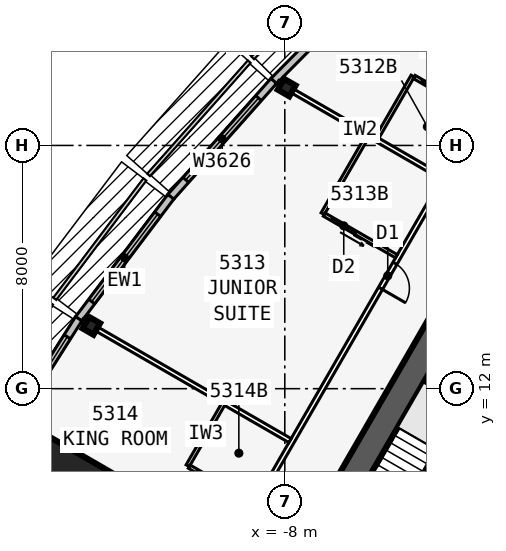
"""IFC4 building model, lengths in metres.
Left out: names, types, materials, properties, quantities, classifications, styles, units other than length and angle.
Written with IfcOpenShell. Run it as: python <this file> out.ifc"""

import sys

from ifc_helpers import new_model, si_unit, direction, frame, frame_2d, origin, origin_2d, place, context, subcontext, project, spatial, rectangle, i_section, extrude, element, fill, save


model = new_model("IFC4")
c1 = context("Model", 3, precision=1e-05, world=origin(), true_north=direction((0.0, 1.0)))
c2 = subcontext(c1, "Body", "Model", "MODEL_VIEW")
j1 = project(units=[si_unit("LENGTHUNIT", "METRE"), si_unit("PLANEANGLEUNIT", "RADIAN")], contexts=[c1])
p1 = place(None, origin())
s1 = spatial("IfcSite", under=j1, at=p1, CompositionType="ELEMENT")
p2 = place(p1, origin())
s2 = spatial("IfcBuilding", under=s1, at=p2, CompositionType="ELEMENT")
p3 = place(p2, frame((0.0, 0.0, 200.9)))
s3 = spatial("IfcBuildingStorey", under=s2, at=p3, CompositionType="ELEMENT", Elevation=200.9)
p4 = place(p3, frame((0.0, 19.052, 0.0), z_axis=(0.0, 0.0, 1.0), x_axis=(-0.499999749417, -0.866025548458, 0.0)))
e1 = element("IfcWall", 1, at=p4, inside=s3, PredefinedType="SHEAR", context=c2, shape_type="SweptSolid", body=[
    extrude(rectangle(XDim=33.0, YDim=0.9, at=frame_2d((16.5, 0.0))), origin(), (0.0, 0.0, 1.0), 3.6),
])
p5 = place(p4, frame((14.15, 0.0, 0.0)))
e2 = element("IfcOpeningElement", 2, at=p5, cuts=e1, PredefinedType="OPENING", context=c2, shape_type="SweptSolid", body=[
    extrude(rectangle(XDim=1.8, YDim=2.13, at=frame_2d((0.9, 1.065))), frame((0.0, 0.46, 0.0), z_axis=(0.0, -1.0, 0.0), x_axis=(1.0, 0.0, 0.0)), (0.0, 0.0, 1.0), 0.92),
])
p6 = place(p4, frame((12.6, 0.0, 0.0)))
e3 = element("IfcOpeningElement", 3, at=p6, cuts=e1, PredefinedType="OPENING", context=c2, shape_type="SweptSolid", body=[
    extrude(rectangle(XDim=1.0, YDim=2.13, at=frame_2d((0.5, 1.065))), frame((0.0, 0.46, 0.0), z_axis=(0.0, -1.0, 0.0), x_axis=(1.0, 0.0, 0.0)), (0.0, 0.0, 1.0), 0.92),
])
p7 = place(p3, frame((-0.062, 11.794, 0.0), z_axis=(0.0, 0.0, 1.0), x_axis=(-0.500006680225, -0.86602154692, 0.0)))
e4 = element("IfcWall", 4, at=p7, inside=s3, PredefinedType="SOLIDWALL", context=c2, shape_type="SweptSolid", body=[
    extrude(rectangle(XDim=7.733, YDim=0.25, at=frame_2d((3.866, 0.0))), origin(), (0.0, 0.0, 1.0), 3.435),
])
p8 = place(p3, frame((-0.679, 10.727, 0.0), z_axis=(0.0, 0.0, 1.0), x_axis=(-0.866022959057, 0.500004234368, 0.0)))
e5 = element("IfcWall", 5, at=p8, inside=s3, PredefinedType="SOLIDWALL", context=c2, shape_type="SweptSolid", body=[
    extrude(rectangle(XDim=3.125, YDim=0.2, at=frame_2d((1.562, 0.0))), origin(), (0.0, 0.0, 1.0), 3.435),
])
for number, where, z_axis, x_axis in (
    (6, (-7.937, 21.903, 0.0), (0.0, 0.0, 1.0), (-0.5, -0.866, 0.0)),
    (7, (-14.363, 14.066, 0.0), (0.0, 0.0, 1.0), (-0.866, 0.5, 0.0)),
):
    element("IfcColumn", number, at=place(p3, frame(where, z_axis=z_axis, x_axis=x_axis)), inside=s3, PredefinedType="COLUMN", context=c2, shape_type="SweptSolid", body=[
        extrude(i_section(OverallWidth=0.411, OverallDepth=0.434, WebThickness=0.036, FlangeThickness=0.057, at=origin_2d()), origin(), (0.0, 0.0, 1.0), 3.6),
    ])
p9 = place(p3, frame((-15.312, 8.84, 0.0), z_axis=(0.0, 0.0, 1.0), x_axis=(-0.866025403784, 0.5, 0.0)))
e8 = element("IfcColumn", 8, at=p9, inside=s3, PredefinedType="COLUMN", context=c2, shape_type="SweptSolid", body=[
    extrude(rectangle(XDim=2.3, YDim=2.3, at=origin_2d()), origin(), (0.0, 0.0, 1.0), 3.6),
])
p10 = place(p3, frame((-6.911, 23.583, 0.0), z_axis=(0.0, 0.0, 1.0), x_axis=(-0.704149946111, -0.710051303352, 0.0)))
e9 = element("IfcWall", 9, at=p10, inside=s3, PredefinedType="STANDARD", context=c2, shape_type="SweptSolid", body=[
    extrude(rectangle(XDim=2.069, YDim=0.25, at=frame_2d((1.034, 0.0))), origin(), (0.0, 0.0, 1.0), 3.435),
])
p11 = place(p3, frame((-8.363, 22.12, 0.0), z_axis=(0.0, 0.0, 1.0), x_axis=(-0.664348996191, -0.747422511876, 0.0)))
e10 = element("IfcWall", 10, at=p11, inside=s3, PredefinedType="STANDARD", context=c2, shape_type="SweptSolid", body=[
    extrude(rectangle(XDim=5.105, YDim=0.25, at=frame_2d((2.552, 0.0))), origin(), (0.0, 0.0, 1.0), 3.435),
])
p12 = place(p11, frame((0.752, 0.0, 0.45)))
e11 = element("IfcOpeningElement", 11, at=p12, cuts=e10, PredefinedType="OPENING", context=c2, shape_type="SweptSolid", body=[
    extrude(rectangle(XDim=3.6, YDim=2.6, at=frame_2d((1.8, 1.3))), frame((0.0, 0.135, 0.0), z_axis=(0.0, -1.0, 0.0), x_axis=(1.0, 0.0, 0.0)), (0.0, 0.0, 1.0), 0.27),
])
p13 = place(p3, frame((-11.748, 18.312, 0.0), z_axis=(0.0, 0.0, 1.0), x_axis=(-0.602408653511, -0.798187831388, 0.0)))
e12 = element("IfcWall", 12, at=p13, inside=s3, PredefinedType="STANDARD", context=c2, shape_type="SweptSolid", body=[
    extrude(rectangle(XDim=5.038, YDim=0.25, at=frame_2d((2.519, 0.0))), origin(), (0.0, 0.0, 1.0), 3.435),
])
p14 = place(p13, frame((0.719, 0.0, 0.45)))
e13 = element("IfcOpeningElement", 13, at=p14, cuts=e12, PredefinedType="OPENING", context=c2, shape_type="SweptSolid", body=[
    extrude(rectangle(XDim=3.6, YDim=2.6, at=frame_2d((1.8, 1.3))), frame((0.0, 0.135, 0.0), z_axis=(0.0, -1.0, 0.0), x_axis=(1.0, 0.0, 0.0)), (0.0, 0.0, 1.0), 0.27),
])
p15 = place(p3, frame((-14.777, 14.299, 0.0), z_axis=(0.0, 0.0, 1.0), x_axis=(-0.535220361449, -0.844712474568, 0.0)))
e14 = element("IfcWall", 14, at=p15, inside=s3, PredefinedType="STANDARD", context=c2, shape_type="SweptSolid", body=[
    extrude(rectangle(XDim=5.004, YDim=0.25, at=frame_2d((2.502, 0.0))), origin(), (0.0, 0.0, 1.0), 3.435),
])
p16 = place(p15, frame((0.702, 0.0, 0.45)))
e15 = element("IfcOpeningElement", 15, at=p16, cuts=e14, PredefinedType="OPENING", context=c2, shape_type="SweptSolid", body=[
    extrude(rectangle(XDim=3.6, YDim=2.6, at=frame_2d((1.8, 1.3))), frame((0.0, 0.135, 0.0), z_axis=(0.0, -1.0, 0.0), x_axis=(1.0, 0.0, 0.0)), (0.0, 0.0, 1.0), 0.27),
])
p17 = place(p3, frame((-0.5, 22.836, 0.0), z_axis=(0.0, 0.0, 1.0), x_axis=(-0.500001677587, -0.866024435227, 0.0)))
e16 = element("IfcWall", 16, at=p17, inside=s3, PredefinedType="PARTITIONING", context=c2, shape_type="SweptSolid", body=[
    extrude(rectangle(XDim=39.054, YDim=0.15, at=frame_2d((19.527, 0.0))), origin(), (0.0, 0.0, 1.0), 3.435),
])
p18 = place(p17, frame((0.952, 0.0, 0.0)))
e17 = element("IfcOpeningElement", 17, at=p18, cuts=e16, PredefinedType="OPENING", context=c2, shape_type="SweptSolid", body=[
    extrude(rectangle(XDim=0.95, YDim=2.13, at=frame_2d((0.475, 1.065))), frame((0.0, 0.085, 0.0), z_axis=(0.0, -1.0, 0.0), x_axis=(1.0, 0.0, 0.0)), (0.0, 0.0, 1.0), 0.17),
])
p19 = place(p17, frame((7.752, 0.0, 0.0)))
e18 = element("IfcOpeningElement", 18, at=p19, cuts=e16, PredefinedType="OPENING", context=c2, shape_type="SweptSolid", body=[
    extrude(rectangle(XDim=0.95, YDim=2.13, at=frame_2d((0.475, 1.065))), frame((0.0, 0.085, 0.0), z_axis=(0.0, -1.0, 0.0), x_axis=(1.0, 0.0, 0.0)), (0.0, 0.0, 1.0), 0.17),
])
p20 = place(p17, frame((17.152, 0.0, 0.0)))
e19 = element("IfcOpeningElement", 19, at=p20, cuts=e16, PredefinedType="OPENING", context=c2, shape_type="SweptSolid", body=[
    extrude(rectangle(XDim=0.95, YDim=2.13, at=frame_2d((0.475, 1.065))), frame((0.0, 0.085, 0.0), z_axis=(0.0, -1.0, 0.0), x_axis=(1.0, 0.0, 0.0)), (0.0, 0.0, 1.0), 0.17),
])
p21 = place(p17, frame((26.552, 0.0, 0.0)))
e20 = element("IfcOpeningElement", 20, at=p21, cuts=e16, PredefinedType="OPENING", context=c2, shape_type="SweptSolid", body=[
    extrude(rectangle(XDim=0.95, YDim=2.13, at=frame_2d((0.475, 1.065))), frame((0.0, 0.085, 0.0), z_axis=(0.0, -1.0, 0.0), x_axis=(1.0, 0.0, 0.0)), (0.0, 0.0, 1.0), 0.17),
])
p22 = place(p17, frame((37.152, 0.0, 0.0)))
e21 = element("IfcOpeningElement", 21, at=p22, cuts=e16, PredefinedType="OPENING", context=c2, shape_type="SweptSolid", body=[
    extrude(rectangle(XDim=0.95, YDim=2.13, at=frame_2d((0.475, 1.065))), frame((0.0, 0.085, 0.0), z_axis=(0.0, -1.0, 0.0), x_axis=(1.0, 0.0, 0.0)), (0.0, 0.0, 1.0), 0.17),
])
p23 = place(p3, frame((-2.829, 18.954, 0.0), z_axis=(0.0, 0.0, 1.0), x_axis=(-0.866026604282, 0.499997920671, 0.0)))
e22 = element("IfcWall", 22, at=p23, inside=s3, PredefinedType="PARTITIONING", context=c2, shape_type="SweptSolid", body=[
    extrude(rectangle(XDim=6.24, YDim=0.15, at=frame_2d((3.12, 0.0))), origin(), (0.0, 0.0, 1.0), 2.589),
])
p24 = place(p3, frame((-7.829, 10.293, 0.0), z_axis=(0.0, 0.0, 1.0), x_axis=(-0.866030558329, 0.49999107196, 0.0)))
e23 = element("IfcWall", 23, at=p24, inside=s3, PredefinedType="PARTITIONING", context=c2, shape_type="SweptSolid", body=[
    extrude(rectangle(XDim=7.894, YDim=0.15, at=frame_2d((3.947, 0.0))), origin(), (0.0, 0.0, 1.0), 2.589),
])
p25 = place(p3, frame((-10.329, 5.963, 0.0), z_axis=(0.0, 0.0, 1.0), x_axis=(-0.866016460812, 0.500015489362, 0.0)))
e24 = element("IfcWall", 24, at=p25, inside=s3, PredefinedType="PARTITIONING", context=c2, shape_type="SweptSolid", body=[
    extrude(rectangle(XDim=8.101, YDim=0.15, at=frame_2d((4.051, 0.0))), origin(), (0.0, 0.0, 1.0), 2.589),
])
p26 = place(p3, frame((-3.793, 22.282, 0.0), z_axis=(0.0, 0.0, 1.0), x_axis=(-0.500001309137, -0.866024647952, 0.0)))
e25 = element("IfcWall", 25, at=p26, inside=s3, PredefinedType="PLUMBINGWALL", context=c2, shape_type="SweptSolid", body=[
    extrude(rectangle(XDim=2.4, YDim=0.12, at=frame_2d((1.2, 0.0))), origin(), (0.0, 0.0, 1.0), 3.435),
])
p27 = place(p3, frame((-1.628, 21.032, 0.0), z_axis=(0.0, 0.0, 1.0), x_axis=(-0.866048967903, 0.499959183527, 0.0)))
e26 = element("IfcWall", 26, at=p27, inside=s3, PredefinedType="PLUMBINGWALL", context=c2, shape_type="SweptSolid", body=[
    extrude(rectangle(XDim=2.44, YDim=0.12, at=frame_2d((1.22, 0.0))), origin(), (0.0, 0.0, 1.0), 3.435),
])
p28 = place(p27, frame((1.25, 0.0, 0.0)))
e27 = element("IfcOpeningElement", 27, at=p28, cuts=e26, PredefinedType="OPENING", context=c2, shape_type="SweptSolid", body=[
    extrude(rectangle(XDim=0.9, YDim=2.13, at=frame_2d((0.45, 1.065))), frame((0.0, 0.07, 0.0), z_axis=(0.0, -1.0, 0.0), x_axis=(1.0, 0.0, 0.0)), (0.0, 0.0, 1.0), 0.14),
])
p29 = place(p3, frame((-5.253, 20.354, 0.0), z_axis=(0.0, 0.0, 1.0), x_axis=(-0.499990139034, -0.866031096941, 0.0)))
e28 = element("IfcWall", 28, at=p29, inside=s3, PredefinedType="PLUMBINGWALL", context=c2, shape_type="SweptSolid", body=[
    extrude(rectangle(XDim=3.0, YDim=0.12, at=frame_2d((1.5, 0.0))), origin(), (0.0, 0.0, 1.0), 3.435),
])
p30 = place(p3, frame((-4.329, 16.355, 0.0), z_axis=(0.0, 0.0, 1.0), x_axis=(-0.866035715982, 0.499982138324, 0.0)))
e29 = element("IfcWall", 29, at=p30, inside=s3, PredefinedType="PLUMBINGWALL", context=c2, shape_type="SweptSolid", body=[
    extrude(rectangle(XDim=2.74, YDim=0.12, at=frame_2d((1.37, 0.0))), origin(), (0.0, 0.0, 1.0), 3.435),
])
p31 = place(p30, frame((1.55, 0.0, 0.0)))
e30 = element("IfcOpeningElement", 30, at=p31, cuts=e29, PredefinedType="OPENING", context=c2, shape_type="SweptSolid", body=[
    extrude(rectangle(XDim=0.9, YDim=2.13, at=frame_2d((0.45, 1.065))), frame((0.0, 0.07, 0.0), z_axis=(0.0, -1.0, 0.0), x_axis=(1.0, 0.0, 0.0)), (0.0, 0.0, 1.0), 0.14),
])
p32 = place(p3, frame((-9.993, 11.543, 0.0), z_axis=(0.0, 0.0, 1.0), x_axis=(-0.500077600433, -0.865980596518, 0.0)))
e31 = element("IfcWall", 31, at=p32, inside=s3, PredefinedType="PLUMBINGWALL", context=c2, shape_type="SweptSolid", body=[
    extrude(rectangle(XDim=2.4, YDim=0.12, at=frame_2d((1.2, 0.0))), origin(), (0.0, 0.0, 1.0), 3.435),
])
p33 = place(p3, frame((-9.029, 8.215, 0.0), z_axis=(0.0, 0.0, 1.0), x_axis=(-0.866023955769, 0.500002508028, 0.0)))
e32 = element("IfcWall", 32, at=p33, inside=s3, PredefinedType="PLUMBINGWALL", context=c2, shape_type="SweptSolid", body=[
    extrude(rectangle(XDim=2.44, YDim=0.12, at=frame_2d((1.22, 0.0))), origin(), (0.0, 0.0, 1.0), 3.435),
])
p34 = place(p33, frame((1.25, 0.0, 0.0)))
e33 = element("IfcOpeningElement", 33, at=p34, cuts=e32, PredefinedType="OPENING", context=c2, shape_type="SweptSolid", body=[
    extrude(rectangle(XDim=0.9, YDim=2.13, at=frame_2d((0.45, 1.065))), frame((0.0, 0.07, 0.0), z_axis=(0.0, -1.0, 0.0), x_axis=(1.0, 0.0, 0.0)), (0.0, 0.0, 1.0), 0.14),
])
p35 = place(p3, frame((-2.988, 9.978, 0.0), z_axis=(0.0, 0.0, 1.0), x_axis=(-0.499992232847, -0.866029888106, 0.0)))
e34 = element("IfcWall", 34, at=p35, inside=s3, PredefinedType="SOLIDWALL", context=c2, shape_type="SweptSolid", body=[
    extrude(rectangle(XDim=2.794, YDim=0.1, at=frame_2d((1.397, 0.0))), origin(), (0.0, 0.0, 1.0), 3.6),
])
p36 = place(p12, origin())
e35 = element("IfcWindow", 35, at=p36, inside=s3, PartitioningType="SINGLE_PANEL", PredefinedType="WINDOW", context=c2, shape_type="SweptSolid", body=[
    extrude(rectangle(XDim=3.6, YDim=2.6, at=frame_2d((1.8, 1.3))), frame((0.0, 0.03, 0.0), z_axis=(0.0, -1.0, 0.0), x_axis=(1.0, 0.0, 0.0)), (0.0, 0.0, 1.0), 0.06),
])
fill(e11, e35)
p37 = place(p14, origin())
e36 = element("IfcWindow", 36, at=p37, inside=s3, PartitioningType="SINGLE_PANEL", PredefinedType="WINDOW", context=c2, shape_type="SweptSolid", body=[
    extrude(rectangle(XDim=3.6, YDim=2.6, at=frame_2d((1.8, 1.3))), frame((0.0, 0.03, 0.0), z_axis=(0.0, -1.0, 0.0), x_axis=(1.0, 0.0, 0.0)), (0.0, 0.0, 1.0), 0.06),
])
fill(e13, e36)
p38 = place(p16, origin())
e37 = element("IfcWindow", 37, at=p38, inside=s3, PartitioningType="SINGLE_PANEL", PredefinedType="WINDOW", context=c2, shape_type="SweptSolid", body=[
    extrude(rectangle(XDim=3.6, YDim=2.6, at=frame_2d((1.8, 1.3))), frame((0.0, 0.03, 0.0), z_axis=(0.0, -1.0, 0.0), x_axis=(1.0, 0.0, 0.0)), (0.0, 0.0, 1.0), 0.06),
])
fill(e15, e37)
p39 = place(p28, origin())
e38 = element("IfcDoor", 38, at=p39, inside=s3, OperationType="SLIDING_TO_LEFT", PredefinedType="DOOR", context=c2, shape_type="SweptSolid", body=[
    extrude(rectangle(XDim=0.9, YDim=2.13, at=frame_2d((0.45, 1.065))), frame((0.0, 0.025, 0.0), z_axis=(0.0, -1.0, 0.0), x_axis=(1.0, 0.0, 0.0)), (0.0, 0.0, 1.0), 0.05),
])
fill(e27, e38)
p40 = place(p31, origin())
e39 = element("IfcDoor", 39, at=p40, inside=s3, OperationType="SLIDING_TO_LEFT", PredefinedType="DOOR", context=c2, shape_type="SweptSolid", body=[
    extrude(rectangle(XDim=0.9, YDim=2.13, at=frame_2d((0.45, 1.065))), frame((0.0, 0.025, 0.0), z_axis=(0.0, -1.0, 0.0), x_axis=(1.0, 0.0, 0.0)), (0.0, 0.0, 1.0), 0.05),
])
fill(e30, e39)
p41 = place(p19, origin())
e40 = element("IfcDoor", 40, at=p41, inside=s3, OperationType="SINGLE_SWING_RIGHT", PredefinedType="DOOR", context=c2, shape_type="SweptSolid", body=[
    extrude(rectangle(XDim=0.95, YDim=2.13, at=frame_2d((0.475, 1.065))), frame((0.0, 0.025, 0.0), z_axis=(0.0, -1.0, 0.0), x_axis=(1.0, 0.0, 0.0)), (0.0, 0.0, 1.0), 0.05),
])
fill(e18, e40)
p42 = place(p34, origin())
e41 = element("IfcDoor", 41, at=p42, inside=s3, OperationType="SLIDING_TO_LEFT", PredefinedType="DOOR", context=c2, shape_type="SweptSolid", body=[
    extrude(rectangle(XDim=0.9, YDim=2.13, at=frame_2d((0.45, 1.065))), frame((0.0, 0.025, 0.0), z_axis=(0.0, -1.0, 0.0), x_axis=(1.0, 0.0, 0.0)), (0.0, 0.0, 1.0), 0.05),
])
fill(e33, e41)
save(model, sys.argv[1])
